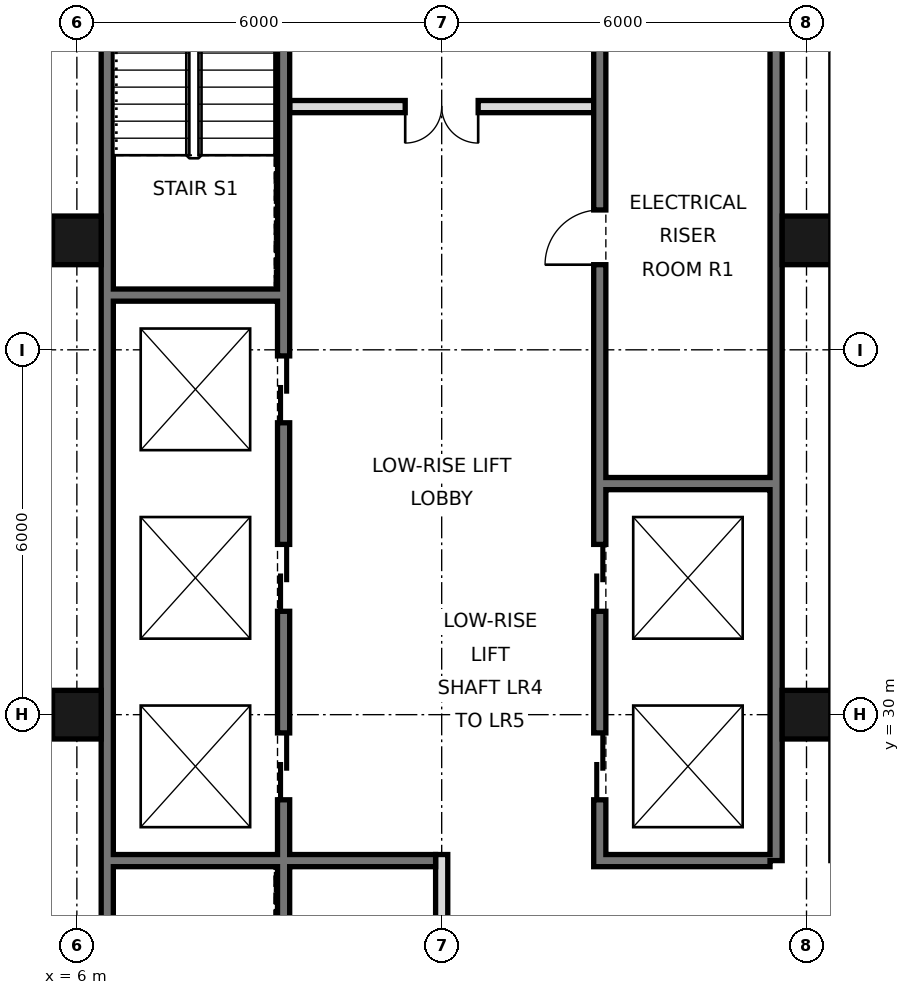
"""IFC4 building model, lengths in metres.
Left out: names, types, materials, properties, quantities, classifications, styles, units other than length and angle.
Written with IfcOpenShell. Run it as: python <this file> out.ifc"""

import sys

from ifc_helpers import new_model, si_unit, direction, frame, frame_2d, origin, origin_2d, place, context, subcontext, project, spatial, rectangle, hollow_rectangle, extrude, element, fill, save


model = new_model("IFC4")
c1 = context("Model", 3, precision=1e-05, world=origin(), true_north=direction((0.0, 1.0)))
c2 = subcontext(c1, "Body", "Model", "MODEL_VIEW")
j1 = project(units=[si_unit("LENGTHUNIT", "METRE"), si_unit("PLANEANGLEUNIT", "RADIAN")], contexts=[c1])
p1 = place(None, origin())
s1 = spatial("IfcSite", under=j1, at=p1, CompositionType="ELEMENT")
p2 = place(p1, origin())
s2 = spatial("IfcBuilding", under=s1, at=p2, CompositionType="ELEMENT")
p3 = place(p2, frame((0.0, 0.0, 114.2)))
s3 = spatial("IfcBuildingStorey", under=s2, at=p3, CompositionType="ELEMENT", Elevation=114.2)
for number, where, z_axis, x_axis in (
    (1, (6.0, 30.0, 0.0), (0.0, 0.0, 1.0), (1.0, 0.0, 0.0)),
    (2, (6.0, 37.8, 0.0), (0.0, 0.0, 1.0), (1.0, 0.0, 0.0)),
    (3, (18.0, 30.0, 0.0), (0.0, 0.0, 1.0), (1.0, 0.0, 0.0)),
    (4, (18.0, 37.8, 0.0), (0.0, 0.0, 1.0), (1.0, 0.0, 0.0)),
):
    element("IfcColumn", number, at=place(p3, frame(where, z_axis=z_axis, x_axis=x_axis)), inside=s3, PredefinedType="COLUMN", context=c2, shape_type="SweptSolid", body=[
        extrude(hollow_rectangle(XDim=0.8, YDim=0.8, WallThickness=0.05, at=origin_2d()), origin(), (0.0, 0.0, 1.0), 5.4),
    ])
p4 = place(p3, frame((6.5, 21.6, 0.0), z_axis=(0.0, 0.0, 1.0), x_axis=(0.0, 1.0, 0.0)))
e5 = element("IfcWall", 5, at=p4, inside=s3, PredefinedType="SOLIDWALL", context=c2, shape_type="SweptSolid", body=[
    extrude(rectangle(XDim=23.5, YDim=0.2, at=frame_2d((11.75, 0.0))), origin(), (0.0, 0.0, 1.0), 5.22),
])
p5 = place(p3, frame((17.5, 27.6, 0.0), z_axis=(0.0, 0.0, 1.0), x_axis=(0.0, 1.0, 0.0)))
e6 = element("IfcWall", 6, at=p5, inside=s3, PredefinedType="SOLIDWALL", context=c2, shape_type="SweptSolid", body=[
    extrude(rectangle(XDim=17.5, YDim=0.2, at=frame_2d((8.75, 0.0))), origin(), (0.0, 0.0, 1.0), 5.22),
])
p6 = place(p3, frame((12.0, 21.6, 0.0), z_axis=(0.0, 0.0, 1.0), x_axis=(0.0, 1.0, 0.0)))
e7 = element("IfcWall", 7, at=p6, inside=s3, PredefinedType="PARTITIONING", context=c2, shape_type="SweptSolid", body=[
    extrude(rectangle(XDim=6.1, YDim=0.2, at=frame_2d((3.05, 0.0))), origin(), (0.0, 0.0, 1.0), 5.22),
])
p7 = place(p3, frame((14.6, 27.5, 0.0), z_axis=(0.0, 0.0, 1.0), x_axis=(0.0, 1.0, 0.0)))
e8 = element("IfcWall", 8, at=p7, inside=s3, PredefinedType="SOLIDWALL", context=c2, shape_type="SweptSolid", body=[
    extrude(rectangle(XDim=17.5, YDim=0.2, at=frame_2d((8.75, 0.0))), origin(), (0.0, 0.0, 1.0), 5.22),
])
p8 = place(p7, frame((1.1, 0.0, 0.0)))
e9 = element("IfcOpeningElement", 9, at=p8, cuts=e8, PredefinedType="OPENING", context=c2, shape_type="SweptSolid", body=[
    extrude(rectangle(XDim=1.1, YDim=2.1, at=frame_2d((0.55, 1.05))), frame((0.0, 0.11, 0.0), z_axis=(0.0, -1.0, 0.0), x_axis=(1.0, 0.0, 0.0)), (0.0, 0.0, 1.0), 0.22),
])
p9 = place(p7, frame((4.2, 0.0, 0.0)))
e10 = element("IfcOpeningElement", 10, at=p9, cuts=e8, PredefinedType="OPENING", context=c2, shape_type="SweptSolid", body=[
    extrude(rectangle(XDim=1.1, YDim=2.1, at=frame_2d((0.55, 1.05))), frame((0.0, 0.11, 0.0), z_axis=(0.0, -1.0, 0.0), x_axis=(1.0, 0.0, 0.0)), (0.0, 0.0, 1.0), 0.22),
])
p10 = place(p7, frame((15.4, 0.0, 0.0)))
e11 = element("IfcOpeningElement", 11, at=p10, cuts=e8, PredefinedType="OPENING", context=c2, shape_type="SweptSolid", body=[
    extrude(rectangle(XDim=1.1, YDim=2.1, at=frame_2d((0.55, 1.05))), frame((0.0, 0.11, 0.0), z_axis=(0.0, -1.0, 0.0), x_axis=(1.0, 0.0, 0.0)), (0.0, 0.0, 1.0), 0.22),
])
p11 = place(p7, frame((9.9, 0.0, 0.0)))
e12 = element("IfcOpeningElement", 12, at=p11, cuts=e8, PredefinedType="OPENING", context=c2, shape_type="SweptSolid", body=[
    extrude(rectangle(XDim=0.9, YDim=2.1, at=frame_2d((0.45, 1.05))), frame((0.0, 0.11, 0.0), z_axis=(0.0, -1.0, 0.0), x_axis=(1.0, 0.0, 0.0)), (0.0, 0.0, 1.0), 0.22),
])
p12 = place(p3, frame((9.4, 21.6, 0.0), z_axis=(0.0, 0.0, 1.0), x_axis=(0.0, 1.0, 0.0)))
e13 = element("IfcWall", 13, at=p12, inside=s3, PredefinedType="SOLIDWALL", context=c2, shape_type="SweptSolid", body=[
    extrude(rectangle(XDim=23.4, YDim=0.2, at=frame_2d((11.7, 0.0))), origin(), (0.0, 0.0, 1.0), 5.22),
])
p13 = place(p12, frame((7.0, 0.0, 0.0)))
e14 = element("IfcOpeningElement", 14, at=p13, cuts=e13, PredefinedType="OPENING", context=c2, shape_type="SweptSolid", body=[
    extrude(rectangle(XDim=1.1, YDim=2.1, at=frame_2d((0.55, 1.05))), frame((0.0, 0.11, 0.0), z_axis=(0.0, -1.0, 0.0), x_axis=(1.0, 0.0, 0.0)), (0.0, 0.0, 1.0), 0.22),
])
p14 = place(p12, frame((10.1, 0.0, 0.0)))
e15 = element("IfcOpeningElement", 15, at=p14, cuts=e13, PredefinedType="OPENING", context=c2, shape_type="SweptSolid", body=[
    extrude(rectangle(XDim=1.1, YDim=2.1, at=frame_2d((0.55, 1.05))), frame((0.0, 0.11, 0.0), z_axis=(0.0, -1.0, 0.0), x_axis=(1.0, 0.0, 0.0)), (0.0, 0.0, 1.0), 0.22),
])
p15 = place(p12, frame((13.2, 0.0, 0.0)))
e16 = element("IfcOpeningElement", 16, at=p15, cuts=e13, PredefinedType="OPENING", context=c2, shape_type="SweptSolid", body=[
    extrude(rectangle(XDim=1.1, YDim=2.1, at=frame_2d((0.55, 1.05))), frame((0.0, 0.11, 0.0), z_axis=(0.0, -1.0, 0.0), x_axis=(1.0, 0.0, 0.0)), (0.0, 0.0, 1.0), 0.22),
])
p16 = place(p12, frame((22.1, 0.0, 0.0)))
e17 = element("IfcOpeningElement", 17, at=p16, cuts=e13, PredefinedType="OPENING", context=c2, shape_type="SweptSolid", body=[
    extrude(rectangle(XDim=1.0, YDim=2.1, at=frame_2d((0.5, 1.05))), frame((0.0, 0.11, 0.0), z_axis=(0.0, -1.0, 0.0), x_axis=(1.0, 0.0, 0.0)), (0.0, 0.0, 1.0), 0.22),
])
p17 = place(p12, frame((0.175, 0.0, 0.0)))
e18 = element("IfcOpeningElement", 18, at=p17, cuts=e13, PredefinedType="OPENING", context=c2, shape_type="SweptSolid", body=[
    extrude(rectangle(XDim=0.9, YDim=2.1, at=frame_2d((0.45, 1.05))), frame((0.0, 0.11, 0.0), z_axis=(0.0, -1.0, 0.0), x_axis=(1.0, 0.0, 0.0)), (0.0, 0.0, 1.0), 0.22),
])
p18 = place(p3, frame((14.7, 27.6, 0.0), z_axis=(0.0, 0.0, 1.0), x_axis=(1.0, 0.0, 0.0)))
e19 = element("IfcWall", 19, at=p18, inside=s3, PredefinedType="SOLIDWALL", context=c2, shape_type="SweptSolid", body=[
    extrude(rectangle(XDim=2.7, YDim=0.2, at=frame_2d((1.35, 0.0))), origin(), (0.0, 0.0, 1.0), 5.22),
])
p19 = place(p3, frame((6.6, 27.6, 0.0), z_axis=(0.0, 0.0, 1.0), x_axis=(1.0, 0.0, 0.0)))
e20 = element("IfcWall", 20, at=p19, inside=s3, PredefinedType="SOLIDWALL", context=c2, shape_type="SweptSolid", body=[
    extrude(rectangle(XDim=5.3, YDim=0.2, at=frame_2d((2.65, 0.0))), origin(), (0.0, 0.0, 1.0), 5.22),
])
for number, where, z_axis, x_axis in (
    (21, (14.7, 33.8, 0.0), (0.0, 0.0, 1.0), (1.0, 0.0, 0.0)),
    (22, (6.6, 36.9, 0.0), (0.0, 0.0, 1.0), (1.0, 0.0, 0.0)),
):
    element("IfcWall", number, at=place(p3, frame(where, z_axis=z_axis, x_axis=x_axis)), inside=s3, PredefinedType="SOLIDWALL", context=c2, shape_type="SweptSolid", body=[
        extrude(rectangle(XDim=2.7, YDim=0.2, at=frame_2d((1.35, 0.0))), origin(), (0.0, 0.0, 1.0), 5.22),
    ])
p20 = place(p3, frame((9.5, 40.0, 0.0), z_axis=(0.0, 0.0, 1.0), x_axis=(1.0, 0.0, 0.0)))
e23 = element("IfcWall", 23, at=p20, inside=s3, PredefinedType="PARTITIONING", context=c2, shape_type="SweptSolid", body=[
    extrude(rectangle(XDim=5.0, YDim=0.2, at=frame_2d((2.5, 0.0))), origin(), (0.0, 0.0, 1.0), 5.22),
])
p21 = place(p20, frame((1.9, 0.0, 0.0)))
e24 = element("IfcOpeningElement", 24, at=p21, cuts=e23, PredefinedType="OPENING", context=c2, shape_type="SweptSolid", body=[
    extrude(rectangle(XDim=1.2, YDim=2.1, at=frame_2d((0.6, 1.05))), frame((0.0, 0.11, 0.0), z_axis=(0.0, -1.0, 0.0), x_axis=(1.0, 0.0, 0.0)), (0.0, 0.0, 1.0), 0.22),
])
p22 = place(p21, frame((1.2, 0.0, 0.0), z_axis=(0.0, 0.0, 1.0), x_axis=(-1.0, 0.0, 0.0)))
e25 = element("IfcDoor", 25, at=p22, inside=s3, OperationType="DOUBLE_DOOR_SINGLE_SWING", PredefinedType="DOOR", context=c2, shape_type="SweptSolid", body=[
    extrude(rectangle(XDim=1.2, YDim=2.1, at=frame_2d((0.6, 1.05))), frame((0.0, 0.025, 0.0), z_axis=(0.0, -1.0, 0.0), x_axis=(1.0, 0.0, 0.0)), (0.0, 0.0, 1.0), 0.05),
])
fill(e24, e25)
p23 = place(p8, origin())
e26 = element("IfcDoor", 26, at=p23, inside=s3, OperationType="DOUBLE_DOOR_SLIDING", PredefinedType="DOOR", context=c2, shape_type="SweptSolid", body=[
    extrude(rectangle(XDim=1.1, YDim=2.1, at=frame_2d((0.55, 1.05))), frame((0.0, 0.025, 0.0), z_axis=(0.0, -1.0, 0.0), x_axis=(1.0, 0.0, 0.0)), (0.0, 0.0, 1.0), 0.05),
])
fill(e9, e26)
p24 = place(p9, origin())
e27 = element("IfcDoor", 27, at=p24, inside=s3, OperationType="DOUBLE_DOOR_SLIDING", PredefinedType="DOOR", context=c2, shape_type="SweptSolid", body=[
    extrude(rectangle(XDim=1.1, YDim=2.1, at=frame_2d((0.55, 1.05))), frame((0.0, 0.025, 0.0), z_axis=(0.0, -1.0, 0.0), x_axis=(1.0, 0.0, 0.0)), (0.0, 0.0, 1.0), 0.05),
])
fill(e10, e27)
p25 = place(p13, origin())
e28 = element("IfcDoor", 28, at=p25, inside=s3, OperationType="DOUBLE_DOOR_SLIDING", PredefinedType="DOOR", context=c2, shape_type="SweptSolid", body=[
    extrude(rectangle(XDim=1.1, YDim=2.1, at=frame_2d((0.55, 1.05))), frame((0.0, 0.025, 0.0), z_axis=(0.0, -1.0, 0.0), x_axis=(1.0, 0.0, 0.0)), (0.0, 0.0, 1.0), 0.05),
])
fill(e14, e28)
p26 = place(p14, origin())
e29 = element("IfcDoor", 29, at=p26, inside=s3, OperationType="DOUBLE_DOOR_SLIDING", PredefinedType="DOOR", context=c2, shape_type="SweptSolid", body=[
    extrude(rectangle(XDim=1.1, YDim=2.1, at=frame_2d((0.55, 1.05))), frame((0.0, 0.025, 0.0), z_axis=(0.0, -1.0, 0.0), x_axis=(1.0, 0.0, 0.0)), (0.0, 0.0, 1.0), 0.05),
])
fill(e15, e29)
p27 = place(p15, origin())
e30 = element("IfcDoor", 30, at=p27, inside=s3, OperationType="DOUBLE_DOOR_SLIDING", PredefinedType="DOOR", context=c2, shape_type="SweptSolid", body=[
    extrude(rectangle(XDim=1.1, YDim=2.1, at=frame_2d((0.55, 1.05))), frame((0.0, 0.025, 0.0), z_axis=(0.0, -1.0, 0.0), x_axis=(1.0, 0.0, 0.0)), (0.0, 0.0, 1.0), 0.05),
])
fill(e16, e30)
p28 = place(p11, origin())
e31 = element("IfcDoor", 31, at=p28, inside=s3, OperationType="SINGLE_SWING_LEFT", PredefinedType="DOOR", context=c2, shape_type="SweptSolid", body=[
    extrude(rectangle(XDim=0.9, YDim=2.1, at=frame_2d((0.45, 1.05))), frame((0.0, 0.025, 0.0), z_axis=(0.0, -1.0, 0.0), x_axis=(1.0, 0.0, 0.0)), (0.0, 0.0, 1.0), 0.05),
])
fill(e12, e31)
save(model, sys.argv[1])
